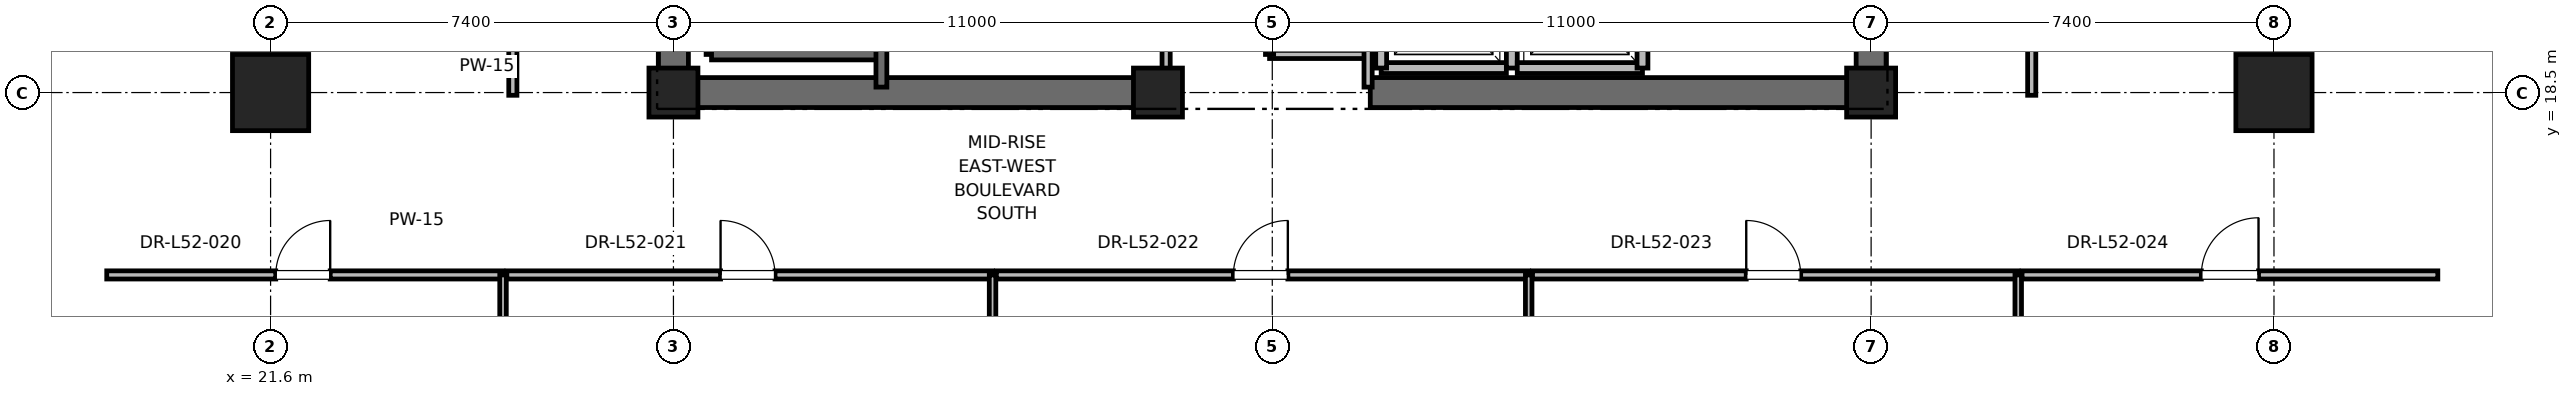
"""IFC4 building model, lengths in metres.
Left out: names, types, materials, properties, quantities, classifications, styles, units other than length and angle.
Written with IfcOpenShell. Run it as: python <this file> out.ifc"""

import sys

from ifc_helpers import new_model, si_unit, direction, frame, frame_2d, origin, origin_2d, place, context, subcontext, project, spatial, rectangle, extrude, element, fill, save


model = new_model("IFC4")
c1 = context("Model", 3, precision=1e-05, world=origin(), true_north=direction((0.0, 1.0)))
c2 = subcontext(c1, "Body", "Model", "MODEL_VIEW")
j1 = project(units=[si_unit("LENGTHUNIT", "METRE"), si_unit("PLANEANGLEUNIT", "RADIAN")], contexts=[c1])
p1 = place(None, origin())
s1 = spatial("IfcSite", under=j1, at=p1, CompositionType="ELEMENT")
p2 = place(p1, origin())
s2 = spatial("IfcBuilding", under=s1, at=p2, CompositionType="ELEMENT")
p3 = place(p2, frame((0.0, 0.0, 225.2)))
s3 = spatial("IfcBuildingStorey", under=s2, at=p3, CompositionType="ELEMENT", Elevation=225.2)
for number, where, z_axis, x_axis in (
    (1, (21.6, 18.5, 0.0), (0.0, 0.0, 1.0), (1.0, 0.0, 0.0)),
    (2, (58.4, 18.5, 0.0), (0.0, 0.0, 1.0), (1.0, 0.0, 0.0)),
):
    element("IfcColumn", number, at=place(p3, frame(where, z_axis=z_axis, x_axis=x_axis)), inside=s3, PredefinedType="COLUMN", context=c2, shape_type="SweptSolid", body=[
        extrude(rectangle(XDim=1.4, YDim=1.4, at=origin_2d()), origin(), (0.0, 0.0, 1.0), 4.0),
    ])
for number, where, z_axis, x_axis in (
    (3, (29.0, 18.5, 0.0), (0.0, 0.0, 1.0), (1.0, 0.0, 0.0)),
    (4, (51.0, 18.5, 0.0), (0.0, 0.0, 1.0), (1.0, 0.0, 0.0)),
    (5, (37.9, 18.5, 0.0), (0.0, 0.0, 1.0), (1.0, 0.0, 0.0)),
):
    element("IfcColumn", number, at=place(p3, frame(where, z_axis=z_axis, x_axis=x_axis)), inside=s3, PredefinedType="PILASTER", context=c2, shape_type="SweptSolid", body=[
        extrude(rectangle(XDim=0.9, YDim=0.9, at=origin_2d()), origin(), (0.0, 0.0, 1.0), 4.0),
    ])
for number, where, z_axis, x_axis in (
    (6, (29.0, 18.5, 0.0), (0.0, 0.0, 1.0), (1.0, 0.0, 0.0)),
    (7, (41.8, 18.5, 0.0), (0.0, 0.0, 1.0), (1.0, 0.0, 0.0)),
):
    element("IfcWall", number, at=place(p3, frame(where, z_axis=z_axis, x_axis=x_axis)), inside=s3, PredefinedType="SHEAR", context=c2, shape_type="SweptSolid", body=[
        extrude(rectangle(XDim=9.2, YDim=0.55, at=frame_2d((4.6, 0.0))), origin(), (0.0, 0.0, 1.0), 3.775),
    ])
p4 = place(p3, frame((29.0, 18.5, 0.0), z_axis=(0.0, 0.0, 1.0), x_axis=(0.0, 1.0, 0.0)))
e8 = element("IfcWall", 8, at=p4, inside=s3, PredefinedType="SHEAR", context=c2, shape_type="SweptSolid", body=[
    extrude(rectangle(XDim=8.8, YDim=0.55, at=frame_2d((4.4, 0.0))), origin(), (0.0, 0.0, 1.0), 3.775),
])
p5 = place(p3, frame((51.0, 18.5, 0.0), z_axis=(0.0, 0.0, 1.0), x_axis=(0.0, 1.0, 0.0)))
e9 = element("IfcWall", 9, at=p5, inside=s3, PredefinedType="SHEAR", context=c2, shape_type="SweptSolid", body=[
    extrude(rectangle(XDim=5.8, YDim=0.55, at=frame_2d((2.9, 0.0))), origin(), (0.0, 0.0, 1.0), 3.775),
])
p6 = place(p3, frame((29.7, 19.2, 0.0), z_axis=(0.0, 0.0, 1.0), x_axis=(0.0, 1.0, 0.0)))
e10 = element("IfcWall", 10, at=p6, inside=s3, PredefinedType="SOLIDWALL", context=c2, shape_type="SweptSolid", body=[
    extrude(rectangle(XDim=8.15, YDim=0.2, at=frame_2d((4.075, 0.0))), origin(), (0.0, 0.0, 1.0), 3.775),
])
p7 = place(p3, frame((29.7, 19.2, 0.0), z_axis=(0.0, 0.0, 1.0), x_axis=(1.0, 0.0, 0.0)))
e11 = element("IfcWall", 11, at=p7, inside=s3, PredefinedType="SOLIDWALL", context=c2, shape_type="SweptSolid", body=[
    extrude(rectangle(XDim=3.12, YDim=0.2, at=frame_2d((1.56, 0.0))), origin(), (0.0, 0.0, 1.0), 3.775),
])
p8 = place(p3, frame((32.82, 18.6, 0.0), z_axis=(0.0, 0.0, 1.0), x_axis=(0.0, 1.0, 0.0)))
e12 = element("IfcWall", 12, at=p8, inside=s3, PredefinedType="SOLIDWALL", context=c2, shape_type="SweptSolid", body=[
    extrude(rectangle(XDim=8.78, YDim=0.2, at=frame_2d((4.39, 0.0))), origin(), (0.0, 0.0, 1.0), 3.775),
])
p9 = place(p3, frame((42.0, 18.95, 0.0), z_axis=(0.0, 0.0, 1.0), x_axis=(1.0, 0.0, 0.0)))
e13 = element("IfcWall", 13, at=p9, inside=s3, PredefinedType="SOLIDWALL", context=c2, shape_type="SweptSolid", body=[
    extrude(rectangle(XDim=2.3, YDim=0.2, at=frame_2d((1.15, 0.0))), origin(), (0.0, 0.0, 1.0), 2.755),
])
p10 = place(p3, frame((42.0, 21.55, 0.0), z_axis=(0.0, 0.0, 1.0), x_axis=(0.0, -1.0, 0.0)))
e14 = element("IfcWall", 14, at=p10, inside=s3, PredefinedType="SOLIDWALL", context=c2, shape_type="SweptSolid", body=[
    extrude(rectangle(XDim=2.6, YDim=0.2, at=frame_2d((1.3, 0.0))), origin(), (0.0, 0.0, 1.0), 2.755),
])
p11 = place(p3, frame((44.4, 18.95, 0.0), z_axis=(0.0, 0.0, 1.0), x_axis=(0.0, 1.0, 0.0)))
e15 = element("IfcWall", 15, at=p11, inside=s3, PredefinedType="SOLIDWALL", context=c2, shape_type="SweptSolid", body=[
    extrude(rectangle(XDim=2.6, YDim=0.2, at=frame_2d((1.3, 0.0))), origin(), (0.0, 0.0, 1.0), 3.775),
])
p12 = place(p3, frame((44.5, 18.95, 0.0), z_axis=(0.0, 0.0, 1.0), x_axis=(1.0, 0.0, 0.0)))
e16 = element("IfcWall", 16, at=p12, inside=s3, PredefinedType="SOLIDWALL", context=c2, shape_type="SweptSolid", body=[
    extrude(rectangle(XDim=2.3, YDim=0.2, at=frame_2d((1.15, 0.0))), origin(), (0.0, 0.0, 1.0), 3.775),
])
p13 = place(p3, frame((46.8, 18.95, 0.0), z_axis=(0.0, 0.0, 1.0), x_axis=(0.0, 1.0, 0.0)))
e17 = element("IfcWall", 17, at=p13, inside=s3, PredefinedType="SOLIDWALL", context=c2, shape_type="SweptSolid", body=[
    extrude(rectangle(XDim=2.6, YDim=0.2, at=frame_2d((1.3, 0.0))), origin(), (0.0, 0.0, 1.0), 3.775),
])
p14 = place(p3, frame((39.95, 19.2, 0.0), z_axis=(0.0, 0.0, 1.0), x_axis=(1.0, 0.0, 0.0)))
e18 = element("IfcWall", 18, at=p14, inside=s3, PredefinedType="PARTITIONING", context=c2, shape_type="SweptSolid", body=[
    extrude(rectangle(XDim=1.81, YDim=0.15, at=frame_2d((0.905, 0.0))), origin(), (0.0, 0.0, 1.0), 2.85),
])
p15 = place(p3, frame((41.76, 18.6, 0.0), z_axis=(0.0, 0.0, 1.0), x_axis=(0.0, 1.0, 0.0)))
e19 = element("IfcWall", 19, at=p15, inside=s3, PredefinedType="PARTITIONING", context=c2, shape_type="SweptSolid", body=[
    extrude(rectangle(XDim=3.6, YDim=0.15, at=frame_2d((1.8, 0.0))), origin(), (0.0, 0.0, 1.0), 2.755),
])
p16 = place(p3, frame((39.95, 19.2, 0.0), z_axis=(0.0, 0.0, 1.0), x_axis=(0.0, 1.0, 0.0)))
e20 = element("IfcWall", 20, at=p16, inside=s3, PredefinedType="PARTITIONING", context=c2, shape_type="SweptSolid", body=[
    extrude(rectangle(XDim=3.0, YDim=0.15, at=frame_2d((1.5, 0.0))), origin(), (0.0, 0.0, 1.0), 2.85),
])
p17 = place(p16, frame((1.05, 0.0, 0.0)))
e21 = element("IfcOpeningElement", 21, at=p17, cuts=e20, PredefinedType="OPENING", context=c2, shape_type="SweptSolid", body=[
    extrude(rectangle(XDim=0.9, YDim=2.1, at=frame_2d((0.45, 1.05))), frame((0.0, 0.075, 0.0), z_axis=(0.0, -1.0, 0.0), x_axis=(1.0, 0.0, 0.0)), (0.0, 0.0, 1.0), 0.15),
])
p18 = place(p3, frame((38.05, 18.6, 0.0), z_axis=(0.0, 0.0, 1.0), x_axis=(0.0, 1.0, 0.0)))
e22 = element("IfcWall", 22, at=p18, inside=s3, PredefinedType="PARTITIONING", context=c2, shape_type="SweptSolid", body=[
    extrude(rectangle(XDim=8.78, YDim=0.15, at=frame_2d((4.39, 0.0))), origin(), (0.0, 0.0, 1.0), 2.755),
])
p19 = place(p18, frame((3.89, 0.0, 0.0)))
e23 = element("IfcOpeningElement", 23, at=p19, cuts=e22, PredefinedType="OPENING", context=c2, shape_type="SweptSolid", body=[
    extrude(rectangle(XDim=1.0, YDim=2.15, at=frame_2d((0.5, 1.075))), frame((0.0, 0.075, 0.0), z_axis=(0.0, -1.0, 0.0), x_axis=(1.0, 0.0, 0.0)), (0.0, 0.0, 1.0), 0.15),
])
p20 = place(p3, frame((18.59, 15.15, 0.0), z_axis=(0.0, 0.0, 1.0), x_axis=(1.0, 0.0, 0.0)))
e24 = element("IfcWall", 24, at=p20, inside=s3, PredefinedType="PARTITIONING", context=c2, shape_type="SweptSolid", body=[
    extrude(rectangle(XDim=7.279, YDim=0.15, at=frame_2d((3.64, 0.0))), origin(), (0.0, 0.0, 1.0), 2.85),
])
p21 = place(p20, frame((3.104, 0.0, 0.0)))
e25 = element("IfcOpeningElement", 25, at=p21, cuts=e24, PredefinedType="OPENING", context=c2, shape_type="SweptSolid", body=[
    extrude(rectangle(XDim=1.0, YDim=2.15, at=frame_2d((0.5, 1.075))), frame((0.0, 0.075, 0.0), z_axis=(0.0, -1.0, 0.0), x_axis=(1.0, 0.0, 0.0)), (0.0, 0.0, 1.0), 0.15),
])
p22 = place(p3, frame((25.87, 5.344, 0.0), z_axis=(0.0, 0.0, 1.0), x_axis=(0.0, 1.0, 0.0)))
e26 = element("IfcWall", 26, at=p22, inside=s3, PredefinedType="PARTITIONING", context=c2, shape_type="SweptSolid", body=[
    extrude(rectangle(XDim=9.806, YDim=0.12, at=frame_2d((4.903, 0.0))), origin(), (0.0, 0.0, 1.0), 2.85),
])
p23 = place(p3, frame((25.94, 15.15, 0.0), z_axis=(0.0, 0.0, 1.0), x_axis=(1.0, 0.0, 0.0)))
e27 = element("IfcWall", 27, at=p23, inside=s3, PredefinedType="PARTITIONING", context=c2, shape_type="SweptSolid", body=[
    extrude(rectangle(XDim=8.922, YDim=0.15, at=frame_2d((4.461, 0.0))), origin(), (0.0, 0.0, 1.0), 2.85),
])
p24 = place(p23, frame((3.926, 0.0, 0.0)))
e28 = element("IfcOpeningElement", 28, at=p24, cuts=e27, PredefinedType="OPENING", context=c2, shape_type="SweptSolid", body=[
    extrude(rectangle(XDim=1.0, YDim=2.15, at=frame_2d((0.5, 1.075))), frame((0.0, 0.075, 0.0), z_axis=(0.0, -1.0, 0.0), x_axis=(1.0, 0.0, 0.0)), (0.0, 0.0, 1.0), 0.15),
])
p25 = place(p3, frame((34.862, 5.344, 0.0), z_axis=(0.0, 0.0, 1.0), x_axis=(0.0, 1.0, 0.0)))
e29 = element("IfcWall", 29, at=p25, inside=s3, PredefinedType="PARTITIONING", context=c2, shape_type="SweptSolid", body=[
    extrude(rectangle(XDim=9.806, YDim=0.12, at=frame_2d((4.903, 0.0))), origin(), (0.0, 0.0, 1.0), 2.405),
])
p26 = place(p3, frame((34.932, 15.15, 0.0), z_axis=(0.0, 0.0, 1.0), x_axis=(1.0, 0.0, 0.0)))
e30 = element("IfcWall", 30, at=p26, inside=s3, PredefinedType="PARTITIONING", context=c2, shape_type="SweptSolid", body=[
    extrude(rectangle(XDim=9.779, YDim=0.15, at=frame_2d((4.889, 0.0))), origin(), (0.0, 0.0, 1.0), 2.85),
])
p27 = place(p26, frame((4.354, 0.0, 0.0)))
e31 = element("IfcOpeningElement", 31, at=p27, cuts=e30, PredefinedType="OPENING", context=c2, shape_type="SweptSolid", body=[
    extrude(rectangle(XDim=1.0, YDim=2.15, at=frame_2d((0.5, 1.075))), frame((0.0, 0.075, 0.0), z_axis=(0.0, -1.0, 0.0), x_axis=(1.0, 0.0, 0.0)), (0.0, 0.0, 1.0), 0.15),
])
p28 = place(p3, frame((44.71, 5.344, 0.0), z_axis=(0.0, 0.0, 1.0), x_axis=(0.0, 1.0, 0.0)))
e32 = element("IfcWall", 32, at=p28, inside=s3, PredefinedType="PARTITIONING", context=c2, shape_type="SweptSolid", body=[
    extrude(rectangle(XDim=9.806, YDim=0.12, at=frame_2d((4.903, 0.0))), origin(), (0.0, 0.0, 1.0), 2.405),
])
p29 = place(p3, frame((44.78, 15.15, 0.0), z_axis=(0.0, 0.0, 1.0), x_axis=(1.0, 0.0, 0.0)))
e33 = element("IfcWall", 33, at=p29, inside=s3, PredefinedType="PARTITIONING", context=c2, shape_type="SweptSolid", body=[
    extrude(rectangle(XDim=8.922, YDim=0.15, at=frame_2d((4.461, 0.0))), origin(), (0.0, 0.0, 1.0), 2.85),
])
p30 = place(p29, frame((3.926, 0.0, 0.0)))
e34 = element("IfcOpeningElement", 34, at=p30, cuts=e33, PredefinedType="OPENING", context=c2, shape_type="SweptSolid", body=[
    extrude(rectangle(XDim=1.0, YDim=2.15, at=frame_2d((0.5, 1.075))), frame((0.0, 0.075, 0.0), z_axis=(0.0, -1.0, 0.0), x_axis=(1.0, 0.0, 0.0)), (0.0, 0.0, 1.0), 0.15),
])
p31 = place(p3, frame((53.702, 5.344, 0.0), z_axis=(0.0, 0.0, 1.0), x_axis=(0.0, 1.0, 0.0)))
e35 = element("IfcWall", 35, at=p31, inside=s3, PredefinedType="PARTITIONING", context=c2, shape_type="SweptSolid", body=[
    extrude(rectangle(XDim=9.806, YDim=0.12, at=frame_2d((4.903, 0.0))), origin(), (0.0, 0.0, 1.0), 2.85),
])
p32 = place(p3, frame((53.772, 15.15, 0.0), z_axis=(0.0, 0.0, 1.0), x_axis=(1.0, 0.0, 0.0)))
e36 = element("IfcWall", 36, at=p32, inside=s3, PredefinedType="PARTITIONING", context=c2, shape_type="SweptSolid", body=[
    extrude(rectangle(XDim=7.637, YDim=0.15, at=frame_2d((3.819, 0.0))), origin(), (0.0, 0.0, 1.0), 2.85),
])
p33 = place(p32, frame((3.294, 0.0, 0.0)))
e37 = element("IfcOpeningElement", 37, at=p33, cuts=e36, PredefinedType="OPENING", context=c2, shape_type="SweptSolid", body=[
    extrude(rectangle(XDim=1.05, YDim=2.2, at=frame_2d((0.525, 1.1))), frame((0.0, 0.075, 0.0), z_axis=(0.0, -1.0, 0.0), x_axis=(1.0, 0.0, 0.0)), (0.0, 0.0, 1.0), 0.15),
])
p34 = place(p3, frame((26.05, 18.45, 0.0), z_axis=(0.0, 0.0, 1.0), x_axis=(0.0, 1.0, 0.0)))
e38 = element("IfcWall", 38, at=p34, inside=s3, PredefinedType="PARTITIONING", context=c2, shape_type="SweptSolid", body=[
    extrude(rectangle(XDim=5.611, YDim=0.15, at=frame_2d((2.806, 0.0))), origin(), (0.0, 0.0, 1.0), 2.85),
])
p35 = place(p34, frame((2.095, 0.0, 0.0)))
e39 = element("IfcOpeningElement", 39, at=p35, cuts=e38, PredefinedType="OPENING", context=c2, shape_type="SweptSolid", body=[
    extrude(rectangle(XDim=1.5, YDim=2.25, at=frame_2d((0.75, 1.125))), frame((0.0, 0.075, 0.0), z_axis=(0.0, -1.0, 0.0), x_axis=(1.0, 0.0, 0.0)), (0.0, 0.0, 1.0), 0.15),
])
p36 = place(p3, frame((53.95, 18.45, 0.0), z_axis=(0.0, 0.0, 1.0), x_axis=(0.0, 1.0, 0.0)))
e40 = element("IfcWall", 40, at=p36, inside=s3, PredefinedType="PARTITIONING", context=c2, shape_type="SweptSolid", body=[
    extrude(rectangle(XDim=6.516, YDim=0.15, at=frame_2d((3.258, 0.0))), origin(), (0.0, 0.0, 1.0), 2.85),
])
p37 = place(p36, frame((2.798, 0.0, 0.0)))
e41 = element("IfcOpeningElement", 41, at=p37, cuts=e40, PredefinedType="OPENING", context=c2, shape_type="SweptSolid", body=[
    extrude(rectangle(XDim=1.0, YDim=2.15, at=frame_2d((0.5, 1.075))), frame((0.0, 0.075, 0.0), z_axis=(0.0, -1.0, 0.0), x_axis=(1.0, 0.0, 0.0)), (0.0, 0.0, 1.0), 0.15),
])
p38 = place(p21, origin())
e42 = element("IfcDoor", 42, at=p38, inside=s3, OperationType="SINGLE_SWING_RIGHT", PredefinedType="DOOR", context=c2, shape_type="SweptSolid", body=[
    extrude(rectangle(XDim=1.0, YDim=2.15, at=frame_2d((0.5, 1.075))), frame((0.0, 0.025, 0.0), z_axis=(0.0, -1.0, 0.0), x_axis=(1.0, 0.0, 0.0)), (0.0, 0.0, 1.0), 0.05),
])
fill(e25, e42)
p39 = place(p24, origin())
e43 = element("IfcDoor", 43, at=p39, inside=s3, OperationType="SINGLE_SWING_LEFT", PredefinedType="DOOR", context=c2, shape_type="SweptSolid", body=[
    extrude(rectangle(XDim=1.0, YDim=2.15, at=frame_2d((0.5, 1.075))), frame((0.0, 0.025, 0.0), z_axis=(0.0, -1.0, 0.0), x_axis=(1.0, 0.0, 0.0)), (0.0, 0.0, 1.0), 0.05),
])
fill(e28, e43)
p40 = place(p27, origin())
e44 = element("IfcDoor", 44, at=p40, inside=s3, OperationType="SINGLE_SWING_RIGHT", PredefinedType="DOOR", context=c2, shape_type="SweptSolid", body=[
    extrude(rectangle(XDim=1.0, YDim=2.15, at=frame_2d((0.5, 1.075))), frame((0.0, 0.025, 0.0), z_axis=(0.0, -1.0, 0.0), x_axis=(1.0, 0.0, 0.0)), (0.0, 0.0, 1.0), 0.05),
])
fill(e31, e44)
p41 = place(p30, origin())
e45 = element("IfcDoor", 45, at=p41, inside=s3, OperationType="SINGLE_SWING_LEFT", PredefinedType="DOOR", context=c2, shape_type="SweptSolid", body=[
    extrude(rectangle(XDim=1.0, YDim=2.15, at=frame_2d((0.5, 1.075))), frame((0.0, 0.025, 0.0), z_axis=(0.0, -1.0, 0.0), x_axis=(1.0, 0.0, 0.0)), (0.0, 0.0, 1.0), 0.05),
])
fill(e34, e45)
p42 = place(p33, origin())
e46 = element("IfcDoor", 46, at=p42, inside=s3, OperationType="SINGLE_SWING_RIGHT", PredefinedType="DOOR", context=c2, shape_type="SweptSolid", body=[
    extrude(rectangle(XDim=1.05, YDim=2.2, at=frame_2d((0.525, 1.1))), frame((0.0, 0.025, 0.0), z_axis=(0.0, -1.0, 0.0), x_axis=(1.0, 0.0, 0.0)), (0.0, 0.0, 1.0), 0.05),
])
fill(e37, e46)
save(model, sys.argv[1])
